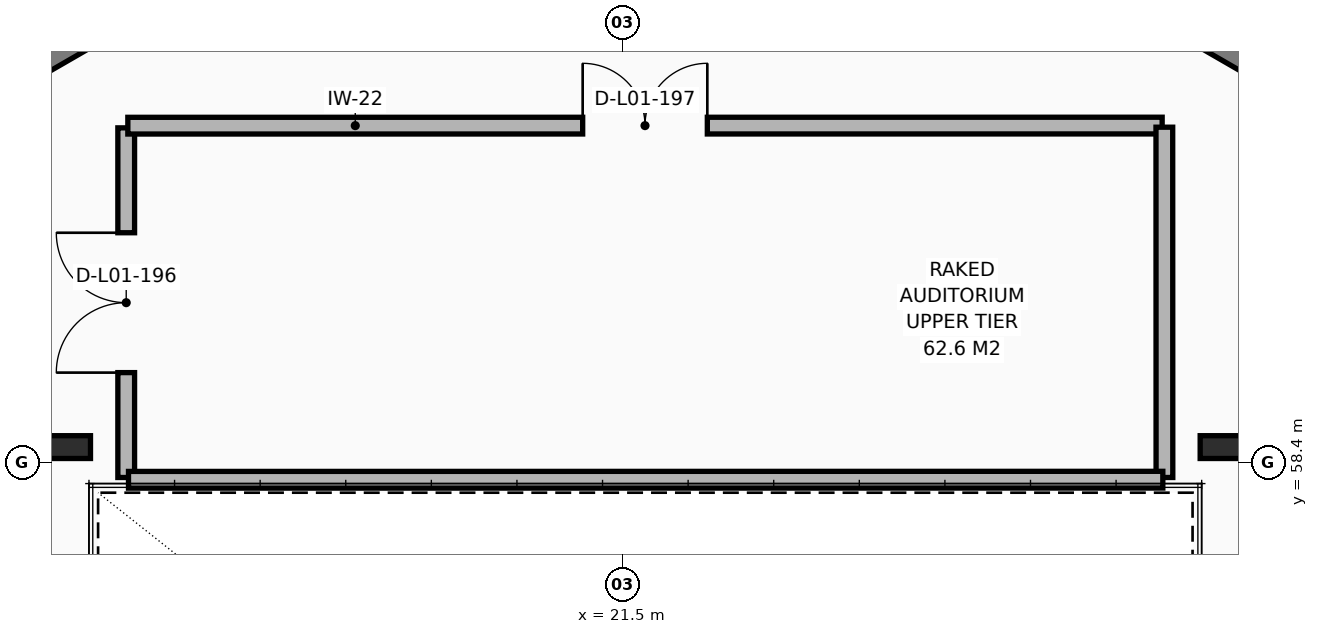
"""IFC4 building model, lengths in metres.
Left out: names, types, materials, properties, quantities, classifications, styles, units other than length and angle.
Written with IfcOpenShell. Run it as: python <this file> out.ifc"""

import sys

from ifc_helpers import new_model, si_unit, direction, frame, frame_2d, origin, origin_2d, place, context, subcontext, project, spatial, rectangle, i_section, extrude, element, fill, save


model = new_model("IFC4")
c1 = context("Model", 3, precision=1e-05, world=origin(), true_north=direction((0.0, 1.0)))
c2 = subcontext(c1, "Body", "Model", "MODEL_VIEW")
j1 = project(units=[si_unit("LENGTHUNIT", "METRE"), si_unit("PLANEANGLEUNIT", "RADIAN")], contexts=[c1])
p1 = place(None, origin())
s1 = spatial("IfcSite", under=j1, at=p1, CompositionType="ELEMENT")
p2 = place(p1, origin())
s2 = spatial("IfcBuilding", under=s1, at=p2, CompositionType="ELEMENT")
p3 = place(p2, frame((0.0, 0.0, 5.1)))
s3 = spatial("IfcBuildingStorey", under=s2, at=p3, CompositionType="ELEMENT", Elevation=5.1)
for number, where, z_axis, x_axis in (
    (1, (29.4, 58.6, 0.0), (0.0, 0.0, 1.0), (1.0, 0.0, 0.0)),
    (2, (14.2, 58.6, 0.0), (0.0, 0.0, 1.0), (1.0, 0.0, 0.0)),
):
    element("IfcColumn", number, at=place(p3, frame(where, z_axis=z_axis, x_axis=x_axis)), inside=s3, PredefinedType="COLUMN", context=c2, shape_type="SweptSolid", body=[
        extrude(i_section(OverallWidth=0.3, OverallDepth=0.6, WebThickness=0.015, FlangeThickness=0.03, FilletRadius=0.027, at=origin_2d()), origin(), (0.0, 0.0, 1.0), 4.42),
    ])
for number, where, z_axis, x_axis in (
    (3, (12.988, 63.19, 0.0), (0.0, 0.0, 1.0), (0.866, 0.5, 0.0)),
    (4, (27.085, 65.226, 0.0), (0.0, 0.0, 1.0), (0.866, -0.5, 0.0)),
):
    element("IfcWall", number, at=place(p3, frame(where, z_axis=z_axis, x_axis=x_axis)), inside=s3, PredefinedType="SOLIDWALL", context=c2, shape_type="SweptSolid", body=[
        extrude(rectangle(XDim=3.892, YDim=0.36, at=frame_2d((1.946, 0.0))), origin(), (0.0, 0.0, 1.0), 4.17),
    ])
p4 = place(p3, frame((14.97, 58.2, 0.0), z_axis=(0.0, 0.0, 1.0), x_axis=(0.0, 1.0, 0.0)))
e5 = element("IfcWall", 5, at=p4, inside=s3, PredefinedType="PARTITIONING", context=c2, shape_type="SweptSolid", body=[
    extrude(rectangle(XDim=4.6, YDim=0.22, at=frame_2d((2.3, 0.0))), origin(), (0.0, 0.0, 1.0), 3.15),
])
p5 = place(p4, frame((1.38, 0.0, 0.0)))
e6 = element("IfcOpeningElement", 6, at=p5, cuts=e5, PredefinedType="OPENING", context=c2, shape_type="SweptSolid", body=[
    extrude(rectangle(XDim=1.84, YDim=2.22, at=frame_2d((0.92, 1.11))), frame((0.0, 0.12, 0.0), z_axis=(0.0, -1.0, 0.0), x_axis=(1.0, 0.0, 0.0)), (0.0, 0.0, 1.0), 0.24),
])
p6 = place(p3, frame((14.991, 62.829, 0.0), z_axis=(0.0, 0.0, 1.0), x_axis=(0.999999994207, 0.000107638764, 0.0)))
e7 = element("IfcWall", 7, at=p6, inside=s3, PredefinedType="PARTITIONING", context=c2, shape_type="SweptSolid", body=[
    extrude(rectangle(XDim=13.609, YDim=0.22, at=frame_2d((6.804, 0.0))), origin(), (0.0, 0.0, 1.0), 3.56),
])
p7 = place(p6, frame((5.984, 0.0, 0.0)))
e8 = element("IfcOpeningElement", 8, at=p7, cuts=e7, PredefinedType="OPENING", context=c2, shape_type="SweptSolid", body=[
    extrude(rectangle(XDim=1.64, YDim=2.2, at=frame_2d((0.82, 1.1))), frame((0.0, 0.12, 0.0), z_axis=(0.0, -1.0, 0.0), x_axis=(1.0, 0.0, 0.0)), (0.0, 0.0, 1.0), 0.24),
])
p8 = place(p3, frame((28.629, 62.809, 0.0), z_axis=(0.0, 0.0, 1.0), x_axis=(0.000264872587, -0.999999964921, 0.0)))
e9 = element("IfcWall", 9, at=p8, inside=s3, PredefinedType="PARTITIONING", context=c2, shape_type="SweptSolid", body=[
    extrude(rectangle(XDim=4.609, YDim=0.22, at=frame_2d((2.304, 0.0))), origin(), (0.0, 0.0, 1.0), 3.15),
])
p9 = place(p3, frame((28.609, 58.171, 0.0), z_axis=(0.0, 0.0, 1.0), x_axis=(-0.999999994207, -0.000107640695, 0.0)))
e10 = element("IfcWall", 10, at=p9, inside=s3, PredefinedType="PARTITIONING", context=c2, shape_type="SweptSolid", body=[
    extrude(rectangle(XDim=13.609, YDim=0.22, at=frame_2d((6.804, 0.0))), origin(), (0.0, 0.0, 1.0), 3.56),
])
p10 = place(p5, origin())
e11 = element("IfcDoor", 11, at=p10, inside=s3, OperationType="DOUBLE_DOOR_SINGLE_SWING", PredefinedType="DOOR", context=c2, shape_type="SweptSolid", body=[
    extrude(rectangle(XDim=1.84, YDim=2.22, at=frame_2d((0.92, 1.11))), frame((0.0, 0.025, 0.0), z_axis=(0.0, -1.0, 0.0), x_axis=(1.0, 0.0, 0.0)), (0.0, 0.0, 1.0), 0.05),
])
fill(e6, e11)
p11 = place(p7, origin())
e12 = element("IfcDoor", 12, at=p11, inside=s3, OperationType="DOUBLE_DOOR_SINGLE_SWING", PredefinedType="DOOR", context=c2, shape_type="SweptSolid", body=[
    extrude(rectangle(XDim=1.64, YDim=2.2, at=frame_2d((0.82, 1.1))), frame((0.0, 0.025, 0.0), z_axis=(0.0, -1.0, 0.0), x_axis=(1.0, 0.0, 0.0)), (0.0, 0.0, 1.0), 0.05),
])
fill(e8, e12)
save(model, sys.argv[1])
